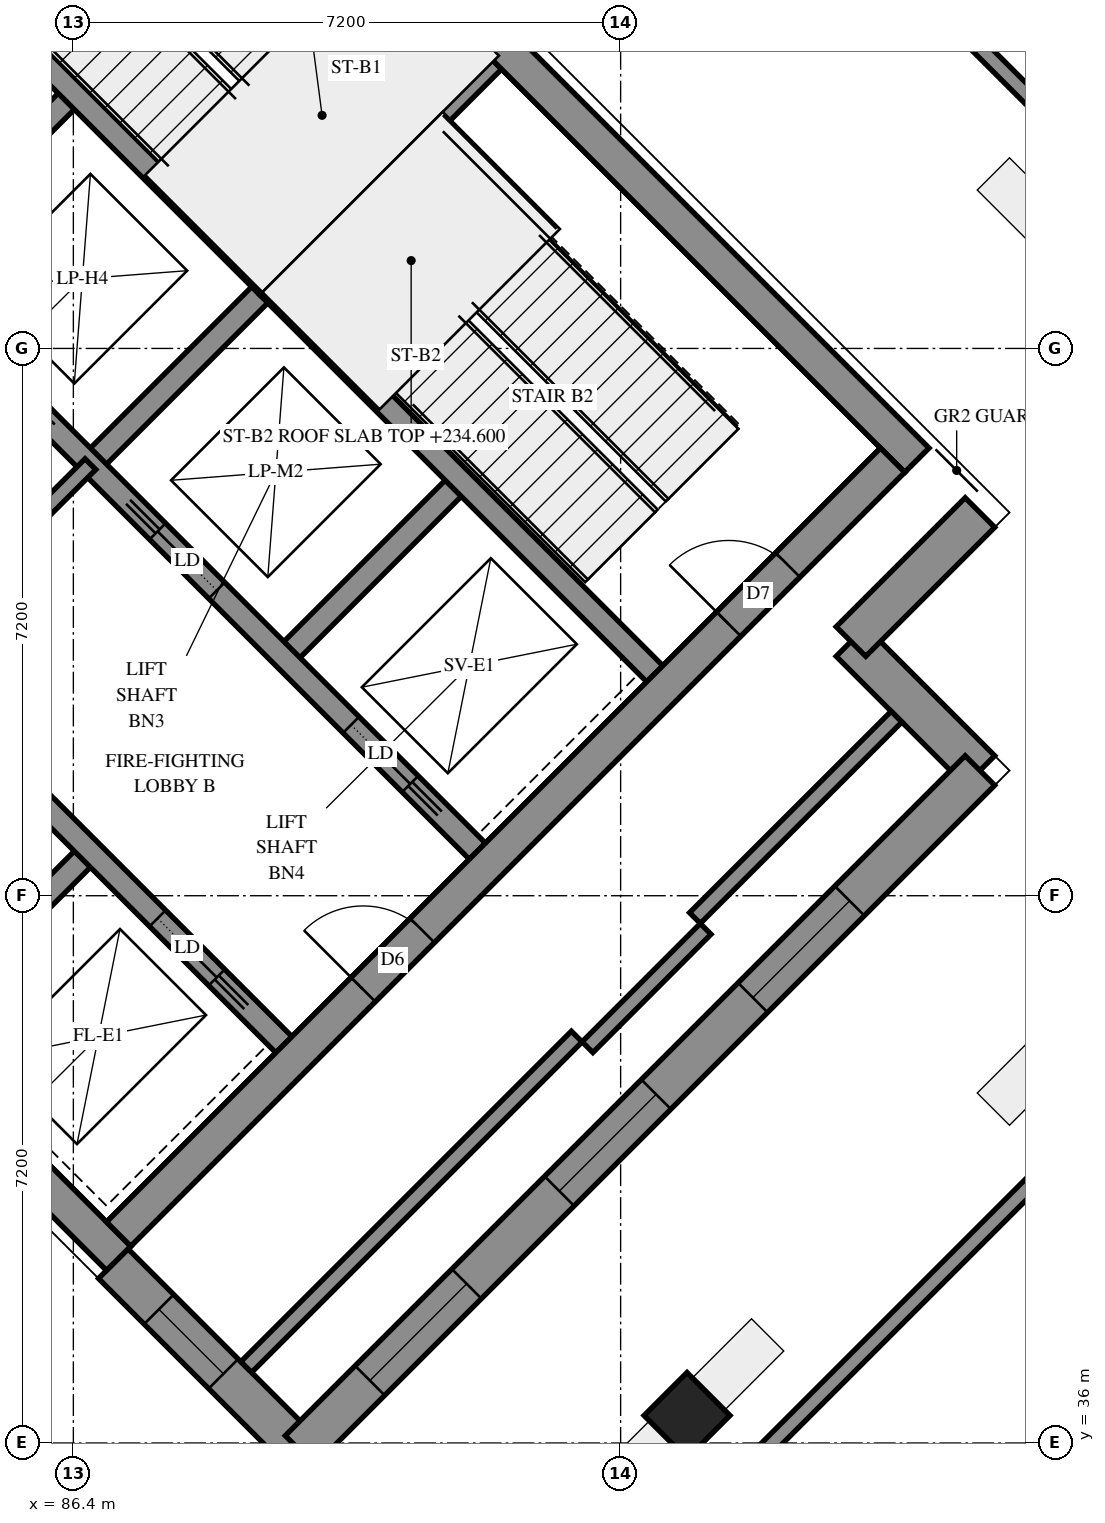
"""IFC4 building model, lengths in metres.
Left out: names, types, materials, properties, quantities, classifications, styles, units other than length and angle.
Written with IfcOpenShell. Run it as: python <this file> out.ifc"""

import sys

from ifc_helpers import new_model, si_unit, direction, frame, frame_2d, origin, origin_2d, place, context, subcontext, project, spatial, polyline, rectangle, outline, extrude, element, fill, save


model = new_model("IFC4")
c1 = context("Model", 3, precision=1e-05, world=origin(), true_north=direction((0.0, 1.0)))
c2 = subcontext(c1, "Body", "Model", "MODEL_VIEW")
j1 = project(units=[si_unit("LENGTHUNIT", "METRE"), si_unit("PLANEANGLEUNIT", "RADIAN")], contexts=[c1])
p1 = place(None, origin())
s1 = spatial("IfcSite", under=j1, at=p1, CompositionType="ELEMENT")
p2 = place(p1, origin())
s2 = spatial("IfcBuilding", under=s1, at=p2, CompositionType="ELEMENT")
p3 = place(p2, frame((0.0, 0.0, 234.6)))
s3 = spatial("IfcBuildingStorey", under=s2, at=p3, CompositionType="ELEMENT", Elevation=234.6)
p4 = place(p3, frame((94.474, 36.362, -0.3), z_axis=(0.0, 0.0, 1.0), x_axis=(0.7071067812, -0.7071067812, 0.0)))
e1 = element("IfcColumn", 1, at=p4, inside=s3, PredefinedType="COLUMN", context=c2, shape_type="SweptSolid", body=[
    extrude(rectangle(XDim=0.8, YDim=0.8, at=origin_2d()), origin(), (0.0, 0.0, 1.0), 5.0),
])
for number, where, z_axis, x_axis in (
    (2, (76.177, 49.249, -0.3), (0.0, 0.0, 1.0), (0.707, -0.707, 0.0)),
    (3, (86.678, 59.749, -0.3), (0.0, 0.0, 1.0), (0.707, -0.707, 0.0)),
):
    element("IfcWall", number, at=place(p3, frame(where, z_axis=z_axis, x_axis=x_axis)), inside=s3, PredefinedType="SHEAR", context=c2, shape_type="SweptSolid", body=[
        extrude(rectangle(XDim=15.3, YDim=0.45, at=frame_2d((7.65, 0.0))), origin(), (0.0, 0.0, 1.0), 4.3),
    ])
p5 = place(p3, frame((76.495, 49.249, -0.3), z_axis=(0.0, 0.0, 1.0), x_axis=(0.7071067812, 0.7071067812, 0.0)))
e4 = element("IfcWall", 4, at=p5, inside=s3, PredefinedType="SHEAR", context=c2, shape_type="SweptSolid", body=[
    extrude(rectangle(XDim=14.4, YDim=0.45, at=frame_2d((7.2, 0.0))), origin(), (0.0, 0.0, 1.0), 4.3),
])
p6 = place(p5, frame((4.55, 0.0, 0.3)))
e5 = element("IfcOpeningElement", 5, at=p6, cuts=e4, PredefinedType="OPENING", context=c2, shape_type="SweptSolid", body=[
    extrude(rectangle(XDim=1.1, YDim=2.1, at=frame_2d((0.55, 1.05))), frame((0.0, 0.235, 0.0), z_axis=(0.0, -1.0, 0.0), x_axis=(1.0, 0.0, 0.0)), (0.0, 0.0, 1.0), 0.47),
])
p7 = place(p5, frame((11.35, 0.0, 0.3)))
e6 = element("IfcOpeningElement", 6, at=p7, cuts=e4, PredefinedType="OPENING", context=c2, shape_type="SweptSolid", body=[
    extrude(rectangle(XDim=1.1, YDim=2.1, at=frame_2d((0.55, 1.05))), frame((0.0, 0.235, 0.0), z_axis=(0.0, -1.0, 0.0), x_axis=(1.0, 0.0, 0.0)), (0.0, 0.0, 1.0), 0.47),
])
p8 = place(p3, frame((86.996, 38.748, -0.3), z_axis=(0.0, 0.0, 1.0), x_axis=(0.7071067812, 0.7071067812, 0.0)))
e7 = element("IfcWall", 7, at=p8, inside=s3, PredefinedType="SHEAR", context=c2, shape_type="SweptSolid", body=[
    extrude(rectangle(XDim=14.4, YDim=0.45, at=frame_2d((7.2, 0.0))), origin(), (0.0, 0.0, 1.0), 4.3),
])
p9 = place(p8, frame((4.55, 0.0, 0.3)))
e8 = element("IfcOpeningElement", 8, at=p9, cuts=e7, PredefinedType="OPENING", context=c2, shape_type="SweptSolid", body=[
    extrude(rectangle(XDim=1.1, YDim=2.1, at=frame_2d((0.55, 1.05))), frame((0.0, 0.235, 0.0), z_axis=(0.0, -1.0, 0.0), x_axis=(1.0, 0.0, 0.0)), (0.0, 0.0, 1.0), 0.47),
])
p10 = place(p8, frame((11.35, 0.0, 0.3)))
e9 = element("IfcOpeningElement", 9, at=p10, cuts=e7, PredefinedType="OPENING", context=c2, shape_type="SweptSolid", body=[
    extrude(rectangle(XDim=1.1, YDim=2.1, at=frame_2d((0.55, 1.05))), frame((0.0, 0.235, 0.0), z_axis=(0.0, -1.0, 0.0), x_axis=(1.0, 0.0, 0.0)), (0.0, 0.0, 1.0), 0.47),
])
p11 = place(p3, frame((84.079, 51.423, 0.0), z_axis=(0.0, 0.0, 1.0), x_axis=(0.7071219326, 0.7070916295, 0.0)))
e10 = element("IfcWall", 10, at=p11, inside=s3, PredefinedType="SOLIDWALL", context=c2, shape_type="SweptSolid", body=[
    extrude(rectangle(XDim=3.3, YDim=0.3, at=frame_2d((1.65, 0.0))), origin(), (0.0, 0.0, 1.0), 4.7),
])
p12 = place(p3, frame((86.625, 48.878, 0.0), z_axis=(0.0, 0.0, 1.0), x_axis=(0.7071067812, 0.7071067812, 0.0)))
e11 = element("IfcWall", 11, at=p12, inside=s3, PredefinedType="SOLIDWALL", context=c2, shape_type="SweptSolid", body=[
    extrude(rectangle(XDim=3.3, YDim=0.3, at=frame_2d((1.65, 0.0))), origin(), (0.0, 0.0, 1.0), 4.7),
])
p13 = place(p3, frame((84.291, 41.453, 0.0), z_axis=(0.0, 0.0, 1.0), x_axis=(0.7071067812, 0.7071067812, 0.0)))
e12 = element("IfcWall", 12, at=p13, inside=s3, PredefinedType="SOLIDWALL", context=c2, shape_type="SweptSolid", body=[
    extrude(rectangle(XDim=3.3, YDim=0.3, at=frame_2d((1.65, 0.0))), origin(), (0.0, 0.0, 1.0), 4.7),
])
p14 = place(p3, frame((89.17, 46.332, 0.0), z_axis=(0.0, 0.0, 1.0), x_axis=(0.7071067812, 0.7071067812, 0.0)))
e13 = element("IfcWall", 13, at=p14, inside=s3, PredefinedType="SOLIDWALL", context=c2, shape_type="SweptSolid", body=[
    extrude(rectangle(XDim=3.3, YDim=0.3, at=frame_2d((1.65, 0.0))), origin(), (0.0, 0.0, 1.0), 4.7),
])
p15 = place(p3, frame((78.988, 51.423, 0.0), z_axis=(0.0, 0.0, 1.0), x_axis=(0.7071067812, -0.7071067812, 0.0)))
e14 = element("IfcWall", 14, at=p15, inside=s3, PredefinedType="SOLIDWALL", context=c2, shape_type="SweptSolid", body=[
    extrude(rectangle(XDim=14.4, YDim=0.3, at=frame_2d((7.2, 0.0))), origin(), (0.0, 0.0, 1.0), 4.7),
])
p16 = place(p15, frame((1.35, 0.0, 0.0)))
e15 = element("IfcOpeningElement", 15, at=p16, cuts=e14, PredefinedType="OPENING", context=c2, shape_type="SweptSolid", body=[
    extrude(rectangle(XDim=0.9, YDim=2.1, at=frame_2d((0.45, 1.05))), frame((0.0, 0.16, 0.0), z_axis=(0.0, -1.0, 0.0), x_axis=(1.0, 0.0, 0.0)), (0.0, 0.0, 1.0), 0.32),
])
p17 = place(p15, frame((4.95, 0.0, 0.0)))
e16 = element("IfcOpeningElement", 16, at=p17, cuts=e14, PredefinedType="OPENING", context=c2, shape_type="SweptSolid", body=[
    extrude(rectangle(XDim=0.9, YDim=2.1, at=frame_2d((0.45, 1.05))), frame((0.0, 0.16, 0.0), z_axis=(0.0, -1.0, 0.0), x_axis=(1.0, 0.0, 0.0)), (0.0, 0.0, 1.0), 0.32),
])
p18 = place(p15, frame((8.55, 0.0, 0.0)))
e17 = element("IfcOpeningElement", 17, at=p18, cuts=e14, PredefinedType="OPENING", context=c2, shape_type="SweptSolid", body=[
    extrude(rectangle(XDim=0.9, YDim=2.1, at=frame_2d((0.45, 1.05))), frame((0.0, 0.16, 0.0), z_axis=(0.0, -1.0, 0.0), x_axis=(1.0, 0.0, 0.0)), (0.0, 0.0, 1.0), 0.32),
])
p19 = place(p15, frame((12.05, 0.0, 0.0)))
e18 = element("IfcOpeningElement", 18, at=p19, cuts=e14, PredefinedType="OPENING", context=c2, shape_type="SweptSolid", body=[
    extrude(rectangle(XDim=1.1, YDim=2.1, at=frame_2d((0.55, 1.05))), frame((0.0, 0.16, 0.0), z_axis=(0.0, -1.0, 0.0), x_axis=(1.0, 0.0, 0.0)), (0.0, 0.0, 1.0), 0.32),
])
p20 = place(p3, frame((81.534, 53.969, 0.0), z_axis=(0.0, 0.0, 1.0), x_axis=(0.707103309, -0.7071102534, 0.0)))
e19 = element("IfcWall", 19, at=p20, inside=s3, PredefinedType="SOLIDWALL", context=c2, shape_type="SweptSolid", body=[
    extrude(rectangle(XDim=14.4, YDim=0.3, at=frame_2d((7.2, 0.0))), origin(), (0.0, 0.0, 1.0), 4.7),
])
p21 = place(p20, frame((1.25, 0.0, 0.0)))
e20 = element("IfcOpeningElement", 20, at=p21, cuts=e19, PredefinedType="OPENING", context=c2, shape_type="SweptSolid", body=[
    extrude(rectangle(XDim=1.1, YDim=2.1, at=frame_2d((0.55, 1.05))), frame((0.0, 0.16, 0.0), z_axis=(0.0, -1.0, 0.0), x_axis=(1.0, 0.0, 0.0)), (0.0, 0.0, 1.0), 0.32),
])
p22 = place(p20, frame((4.85, 0.0, 0.0)))
e21 = element("IfcOpeningElement", 21, at=p22, cuts=e19, PredefinedType="OPENING", context=c2, shape_type="SweptSolid", body=[
    extrude(rectangle(XDim=1.1, YDim=2.1, at=frame_2d((0.55, 1.05))), frame((0.0, 0.16, 0.0), z_axis=(0.0, -1.0, 0.0), x_axis=(1.0, 0.0, 0.0)), (0.0, 0.0, 1.0), 0.32),
])
p23 = place(p20, frame((8.45, 0.0, 0.0)))
e22 = element("IfcOpeningElement", 22, at=p23, cuts=e19, PredefinedType="OPENING", context=c2, shape_type="SweptSolid", body=[
    extrude(rectangle(XDim=1.1, YDim=2.1, at=frame_2d((0.55, 1.05))), frame((0.0, 0.16, 0.0), z_axis=(0.0, -1.0, 0.0), x_axis=(1.0, 0.0, 0.0)), (0.0, 0.0, 1.0), 0.32),
])
p24 = place(p20, frame((12.05, 0.0, 0.0)))
e23 = element("IfcOpeningElement", 23, at=p24, cuts=e19, PredefinedType="OPENING", context=c2, shape_type="SweptSolid", body=[
    extrude(rectangle(XDim=1.1, YDim=2.1, at=frame_2d((0.55, 1.05))), frame((0.0, 0.16, 0.0), z_axis=(0.0, -1.0, 0.0), x_axis=(1.0, 0.0, 0.0)), (0.0, 0.0, 1.0), 0.32),
])
for number, where, z_axis, x_axis in (
    (24, (83.867, 56.302, 0.0), (0.0, 0.0, 1.0), (0.707, -0.707, 0.0)),
    (25, (88.958, 51.211, 0.0), (0.0, 0.0, 1.0), (0.707, -0.707, 0.0)),
):
    element("IfcWall", number, at=place(p3, frame(where, z_axis=z_axis, x_axis=x_axis)), inside=s3, PredefinedType="SOLIDWALL", context=c2, shape_type="SweptSolid", body=[
        extrude(rectangle(XDim=7.2, YDim=0.3, at=frame_2d((3.6, 0.0))), origin(), (0.0, 0.0, 1.0), 4.7),
    ])
p25 = place(p3, frame((88.958, 51.211, 0.0), z_axis=(0.0, 0.0, 1.0), x_axis=(0.7071067812, 0.7071067812, 0.0)))
e26 = element("IfcWall", 26, at=p25, inside=s3, PredefinedType="SOLIDWALL", context=c2, shape_type="SweptSolid", body=[
    extrude(rectangle(XDim=4.2, YDim=0.3, at=frame_2d((2.1, 0.0))), origin(), (0.0, 0.0, 1.0), 4.7),
])
p26 = place(p3, frame((98.327, 44.847, 0.0), z_axis=(0.0, 0.0, 1.0), x_axis=(-0.7070859475, 0.7071276143, 0.0)))
e27 = element("IfcWall", 27, at=p26, inside=s3, PredefinedType="SOLIDWALL", context=c2, shape_type="SweptSolid", body=[
    extrude(outline(polyline([(-0.275, -0.275), (2.125, -0.275), (2.675, 0.275), (0.275, 0.275), (-0.275, -0.275)])), origin(), (0.0, 0.0, 1.0), 4.7),
])
p27 = place(p3, frame((96.63, 46.544, 0.0), z_axis=(0.0, 0.0, 1.0), x_axis=(0.7071067812, 0.7071067812, 0.0)))
e28 = element("IfcWall", 28, at=p27, inside=s3, PredefinedType="SOLIDWALL", context=c2, shape_type="SweptSolid", body=[
    extrude(outline(polyline([(0.275, -0.275), (2.675, -0.275), (2.125, 0.275), (-0.275, 0.275), (0.275, -0.275)])), origin(), (0.0, 0.0, 1.0), 4.7),
])
p28 = place(p3, frame((86.925, 38.359, 0.0), z_axis=(0.0, 0.0, 1.0), x_axis=(0.7070923923, -0.7071211698, 0.0)))
e29 = element("IfcWall", 29, at=p28, inside=s3, PredefinedType="SOLIDWALL", context=c2, shape_type="SweptSolid", body=[
    extrude(outline(polyline([(0.0, -0.275), (3.75, -0.275), (3.2, 0.275), (0.0, 0.275), (0.0, -0.275)])), origin(), (0.0, 0.0, 1.0), 4.7),
])
p29 = place(p28, frame((0.849, 0.0, 0.7)))
e30 = element("IfcOpeningElement", 30, at=p29, cuts=e29, PredefinedType="OPENING", context=c2, shape_type="SweptSolid", body=[
    extrude(rectangle(XDim=1.2, YDim=2.3, at=frame_2d((0.6, 1.15))), frame((0.0, 0.285, 0.0), z_axis=(0.0, -1.0, 0.0), x_axis=(1.0, 0.0, 0.0)), (0.0, 0.0, 1.0), 0.57),
])
p30 = place(p3, frame((89.382, 35.902, 0.0), z_axis=(0.0, 0.0, 1.0), x_axis=(0.7071067812, 0.7071067812, 0.0)))
e31 = element("IfcWall", 31, at=p30, inside=s3, PredefinedType="SOLIDWALL", context=c2, shape_type="SweptSolid", body=[
    extrude(outline(polyline([(-0.275, -0.275), (12.925, -0.275), (12.375, 0.275), (0.275, 0.275), (-0.275, -0.275)])), origin(), (0.0, 0.0, 1.0), 4.7),
])
p31 = place(p30, frame((1.3, 0.0, 0.9)))
e32 = element("IfcOpeningElement", 32, at=p31, cuts=e31, PredefinedType="OPENING", context=c2, shape_type="SweptSolid", body=[
    extrude(rectangle(XDim=1.8, YDim=3.6, at=frame_2d((0.9, 1.8))), frame((0.0, 0.285, 0.0), z_axis=(0.0, -1.0, 0.0), x_axis=(1.0, 0.0, 0.0)), (0.0, 0.0, 1.0), 0.57),
])
p32 = place(p30, frame((4.825, 0.0, 0.9)))
e33 = element("IfcOpeningElement", 33, at=p32, cuts=e31, PredefinedType="OPENING", context=c2, shape_type="SweptSolid", body=[
    extrude(rectangle(XDim=1.8, YDim=3.6, at=frame_2d((0.9, 1.8))), frame((0.0, 0.285, 0.0), z_axis=(0.0, -1.0, 0.0), x_axis=(1.0, 0.0, 0.0)), (0.0, 0.0, 1.0), 0.57),
])
p33 = place(p30, frame((8.425, 0.0, 0.9)))
e34 = element("IfcOpeningElement", 34, at=p33, cuts=e31, PredefinedType="OPENING", context=c2, shape_type="SweptSolid", body=[
    extrude(rectangle(XDim=1.8, YDim=3.6, at=frame_2d((0.9, 1.8))), frame((0.0, 0.285, 0.0), z_axis=(0.0, -1.0, 0.0), x_axis=(1.0, 0.0, 0.0)), (0.0, 0.0, 1.0), 0.57),
])
p34 = place(p3, frame((102.747, 49.938, 0.0), z_axis=(0.0, 0.0, 1.0), x_axis=(-0.7071083109, 0.7071052514, 0.0)))
e35 = element("IfcWall", 35, at=p34, inside=s3, PredefinedType="SOLIDWALL", context=c2, shape_type="SweptSolid", body=[
    extrude(outline(polyline([(-0.1, -0.1), (32.726, -0.1), (32.644, 0.1), (0.1, 0.1), (-0.1, -0.1)])), origin(), (0.0, 0.0, 1.0), 4.7),
])
p35 = place(p3, frame((77.018, 42.15, 0.0), z_axis=(0.0, 0.0, 1.0), x_axis=(0.7071039217, -0.7071096407, 0.0)))
e36 = element("IfcWall", 36, at=p35, inside=s3, PredefinedType="SOLIDWALL", context=c2, shape_type="SweptSolid", body=[
    extrude(outline(polyline([(0.041, -0.1), (17.586, -0.1), (17.386, 0.1), (-0.041, 0.1), (0.041, -0.1)])), origin(), (0.0, 0.0, 1.0), 4.7),
])
p36 = place(p3, frame((89.382, 29.786, 0.0), z_axis=(0.0, 0.0, 1.0), x_axis=(0.7071094267, 0.7071041357, 0.0)))
e37 = element("IfcWall", 37, at=p36, inside=s3, PredefinedType="SOLIDWALL", context=c2, shape_type="SweptSolid", body=[
    extrude(outline(polyline([(-0.1, -0.1), (19.0, -0.1), (18.8, 0.1), (0.1, 0.1), (-0.1, -0.1)])), origin(), (0.0, 0.0, 1.0), 4.7),
])
p37 = place(p3, frame((84.079, 46.332, 0.0), z_axis=(0.0, 0.0, 1.0), x_axis=(0.7071067812, 0.7071067812, 0.0)))
e38 = element("IfcWall", 38, at=p37, inside=s3, PredefinedType="PARTITIONING", context=c2, shape_type="SweptSolid", body=[
    extrude(rectangle(XDim=3.6, YDim=0.2, at=frame_2d((1.8, 0.0))), origin(), (0.0, 0.0, 1.0), 4.7),
])
p38 = place(p3, frame((88.674, 36.999, 0.0), z_axis=(0.0, 0.0, 1.0), x_axis=(0.7071067812, 0.7071067812, 0.0)))
e39 = element("IfcWall", 39, at=p38, inside=s3, PredefinedType="PARTITIONING", context=c2, shape_type="SweptSolid", body=[
    extrude(rectangle(XDim=6.149, YDim=0.2, at=frame_2d((3.075, 0.0))), origin(), (0.0, 0.0, 1.0), 4.7),
])
p39 = place(p3, frame((94.578, 42.906, 0.0), z_axis=(0.0, 0.0, 1.0), x_axis=(0.7073734931, 0.7068399686, 0.0)))
e40 = element("IfcWall", 40, at=p39, inside=s3, PredefinedType="PARTITIONING", context=c2, shape_type="SweptSolid", body=[
    extrude(rectangle(XDim=3.749, YDim=0.2, at=frame_2d((1.874, 0.0))), origin(), (0.0, 0.0, 1.0), 4.7),
])
p40 = place(p3, frame((93.164, 41.208, 0.0), z_axis=(0.0, 0.0, 1.0), x_axis=(0.706651904, 0.7075613659, 0.0)))
e41 = element("IfcWall", 41, at=p40, inside=s3, PredefinedType="PARTITIONING", context=c2, shape_type="SweptSolid", body=[
    extrude(rectangle(XDim=2.199, YDim=0.2, at=frame_2d((1.1, 0.0))), origin(), (0.0, 0.0, 1.0), 4.7),
])
p41 = place(p31, origin())
e42 = element("IfcWindow", 42, at=p41, inside=s3, PartitioningType="SINGLE_PANEL", PredefinedType="WINDOW", context=c2, shape_type="SweptSolid", body=[
    extrude(rectangle(XDim=1.8, YDim=3.6, at=frame_2d((0.9, 1.8))), frame((0.0, 0.155, 0.0), z_axis=(0.0, -1.0, 0.0), x_axis=(1.0, 0.0, 0.0)), (0.0, 0.0, 1.0), 0.06),
])
fill(e32, e42)
p42 = place(p32, origin())
e43 = element("IfcWindow", 43, at=p42, inside=s3, PartitioningType="SINGLE_PANEL", PredefinedType="WINDOW", context=c2, shape_type="SweptSolid", body=[
    extrude(rectangle(XDim=1.8, YDim=3.6, at=frame_2d((0.9, 1.8))), frame((0.0, 0.155, 0.0), z_axis=(0.0, -1.0, 0.0), x_axis=(1.0, 0.0, 0.0)), (0.0, 0.0, 1.0), 0.06),
])
fill(e33, e43)
p43 = place(p33, origin())
e44 = element("IfcWindow", 44, at=p43, inside=s3, PartitioningType="SINGLE_PANEL", PredefinedType="WINDOW", context=c2, shape_type="SweptSolid", body=[
    extrude(rectangle(XDim=1.8, YDim=3.6, at=frame_2d((0.9, 1.8))), frame((0.0, 0.155, 0.0), z_axis=(0.0, -1.0, 0.0), x_axis=(1.0, 0.0, 0.0)), (0.0, 0.0, 1.0), 0.06),
])
fill(e34, e44)
p44 = place(p9, origin())
e45 = element("IfcDoor", 45, at=p44, inside=s3, OperationType="DOUBLE_DOOR_SINGLE_SWING", PredefinedType="DOOR", context=c2, shape_type="SweptSolid", body=[
    extrude(rectangle(XDim=1.1, YDim=2.1, at=frame_2d((0.55, 1.05))), frame((0.0, 0.025, 0.0), z_axis=(0.0, -1.0, 0.0), x_axis=(1.0, 0.0, 0.0)), (0.0, 0.0, 1.0), 0.05),
])
fill(e8, e45)
p45 = place(p10, origin())
e46 = element("IfcDoor", 46, at=p45, inside=s3, OperationType="SINGLE_SWING_RIGHT", PredefinedType="DOOR", context=c2, shape_type="SweptSolid", body=[
    extrude(rectangle(XDim=1.1, YDim=2.1, at=frame_2d((0.55, 1.05))), frame((0.0, 0.025, 0.0), z_axis=(0.0, -1.0, 0.0), x_axis=(1.0, 0.0, 0.0)), (0.0, 0.0, 1.0), 0.05),
])
fill(e9, e46)
p46 = place(p19, origin())
e47 = element("IfcDoor", 47, at=p46, inside=s3, OperationType="SLIDING_TO_RIGHT", PredefinedType="DOOR", context=c2, shape_type="SweptSolid", body=[
    extrude(rectangle(XDim=1.1, YDim=2.1, at=frame_2d((0.55, 1.05))), frame((0.0, 0.025, 0.0), z_axis=(0.0, -1.0, 0.0), x_axis=(1.0, 0.0, 0.0)), (0.0, 0.0, 1.0), 0.05),
])
fill(e18, e47)
p47 = place(p23, origin())
e48 = element("IfcDoor", 48, at=p47, inside=s3, OperationType="SLIDING_TO_LEFT", PredefinedType="DOOR", context=c2, shape_type="SweptSolid", body=[
    extrude(rectangle(XDim=1.1, YDim=2.1, at=frame_2d((0.55, 1.05))), frame((0.0, 0.025, 0.0), z_axis=(0.0, -1.0, 0.0), x_axis=(1.0, 0.0, 0.0)), (0.0, 0.0, 1.0), 0.05),
])
fill(e22, e48)
p48 = place(p24, origin())
e49 = element("IfcDoor", 49, at=p48, inside=s3, OperationType="SLIDING_TO_RIGHT", PredefinedType="DOOR", context=c2, shape_type="SweptSolid", body=[
    extrude(rectangle(XDim=1.1, YDim=2.1, at=frame_2d((0.55, 1.05))), frame((0.0, 0.025, 0.0), z_axis=(0.0, -1.0, 0.0), x_axis=(1.0, 0.0, 0.0)), (0.0, 0.0, 1.0), 0.05),
])
fill(e23, e49)
p49 = place(p29, origin())
e50 = element("IfcWindow", 50, at=p49, inside=s3, PartitioningType="SINGLE_PANEL", PredefinedType="WINDOW", context=c2, shape_type="SweptSolid", body=[
    extrude(rectangle(XDim=1.2, YDim=2.3, at=frame_2d((0.6, 1.15))), frame((0.0, 0.155, 0.0), z_axis=(0.0, -1.0, 0.0), x_axis=(1.0, 0.0, 0.0)), (0.0, 0.0, 1.0), 0.06),
])
fill(e30, e50)
save(model, sys.argv[1])
